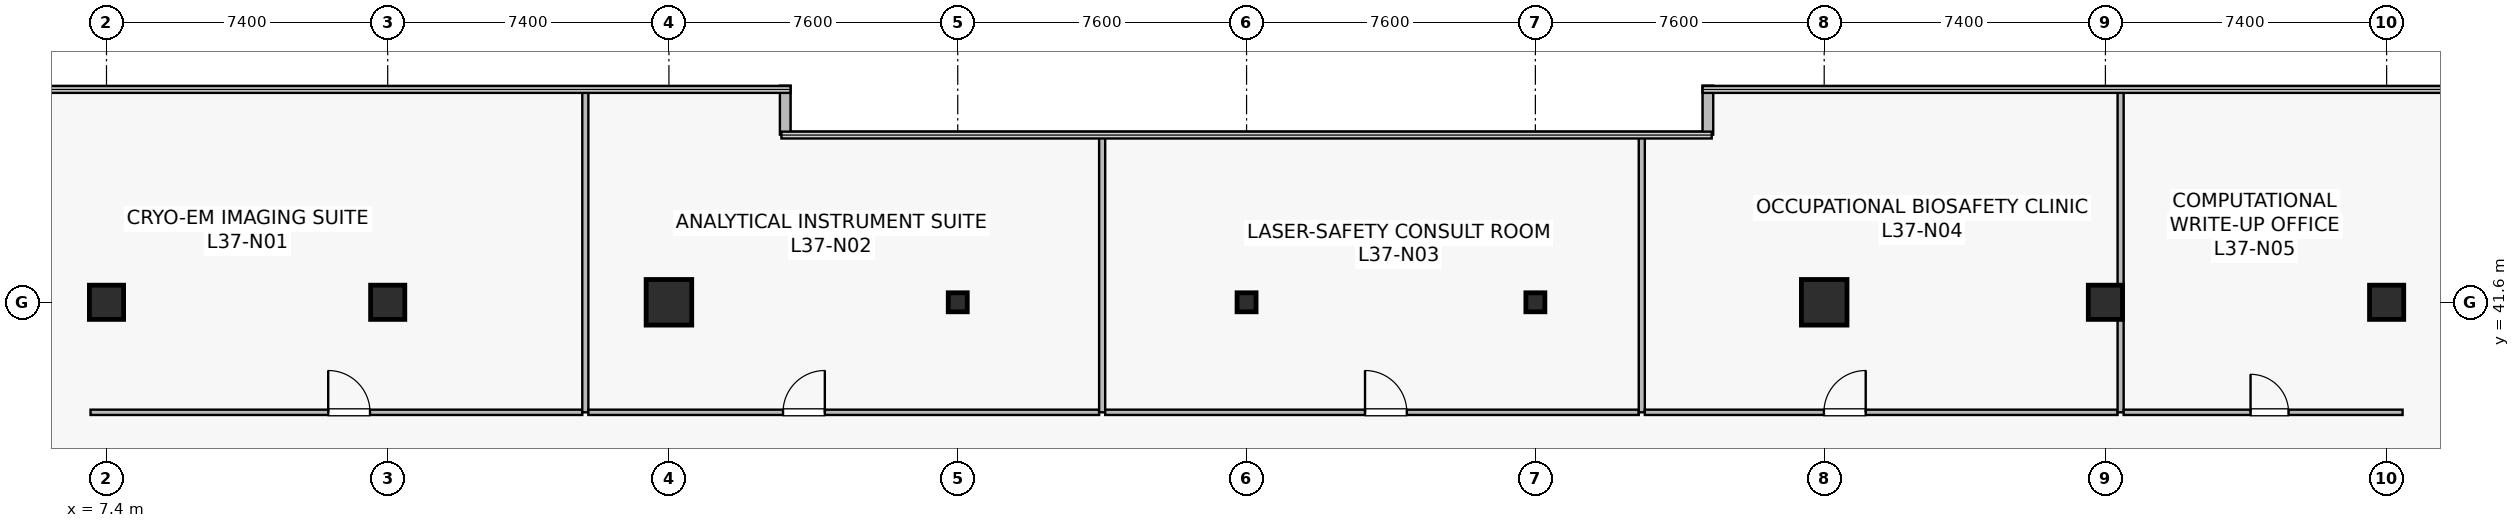
"""IFC4 building model, lengths in metres.
Left out: names, types, materials, properties, quantities, classifications, styles, units other than length and angle.
Written with IfcOpenShell. Run it as: python <this file> out.ifc"""

import sys

from ifc_helpers import new_model, si_unit, direction, frame, frame_2d, origin, origin_2d, place, context, subcontext, project, spatial, rectangle, hollow_rectangle, extrude, source, transform, mapped, element, fill, save


model = new_model("IFC4")
c1 = context("Model", 3, precision=1e-05, world=origin(), true_north=direction((0.0, 1.0)))
c2 = subcontext(c1, "Body", "Model", "MODEL_VIEW")
j1 = project(units=[si_unit("LENGTHUNIT", "METRE"), si_unit("PLANEANGLEUNIT", "RADIAN")], contexts=[c1])
p1 = place(None, origin())
s1 = spatial("IfcSite", under=j1, at=p1, CompositionType="ELEMENT")
p2 = place(p1, origin())
s2 = spatial("IfcBuilding", under=s1, at=p2, CompositionType="ELEMENT")
p3 = place(p2, frame((0.0, 0.0, 154.3)))
s3 = spatial("IfcBuildingStorey", under=s2, at=p3, CompositionType="ELEMENT", Elevation=154.3)
m1 = source(origin(), c2, "Body", "SweptSolid", [
    extrude(rectangle(XDim=0.9, YDim=0.9, at=origin_2d()), origin(), (0.0, 0.0, 1.0), 4.1),
])
p4 = place(p3, frame((14.8, 41.6, 0.0), z_axis=(0.0, 0.0, 1.0), x_axis=(1.0, 0.0, 0.0)))
e1 = element("IfcColumn", 1, at=p4, inside=s3, PredefinedType="COLUMN", context=c2, shape_type="MappedRepresentation", body=[
    mapped(m1, transform((0.0, 0.0, 0.0), scale=1.0)),
])
m2 = source(origin(), c2, "Body", "SweptSolid", [
    extrude(rectangle(XDim=1.2, YDim=1.2, at=origin_2d()), origin(), (0.0, 0.0, 1.0), 4.1),
])
for number, where, z_axis, x_axis in (
    (2, (22.2, 41.6, 0.0), (0.0, 0.0, 1.0), (1.0, 0.0, 0.0)),
    (3, (52.6, 41.6, 0.0), (0.0, 0.0, 1.0), (1.0, 0.0, 0.0)),
):
    element("IfcColumn", number, at=place(p3, frame(where, z_axis=z_axis, x_axis=x_axis)), inside=s3, PredefinedType="COLUMN", context=c2, shape_type="MappedRepresentation", body=[
        mapped(m2, transform((0.0, 0.0, 0.0), scale=1.0)),
    ])
for number, where, z_axis, x_axis in (
    (4, (60.0, 41.6, 0.0), (0.0, 0.0, 1.0), (1.0, 0.0, 0.0)),
    (5, (7.4, 41.6, 0.0), (0.0, 0.0, 1.0), (1.0, 0.0, 0.0)),
    (6, (67.4, 41.6, 0.0), (0.0, 0.0, 1.0), (1.0, 0.0, 0.0)),
):
    element("IfcColumn", number, at=place(p3, frame(where, z_axis=z_axis, x_axis=x_axis)), inside=s3, PredefinedType="COLUMN", context=c2, shape_type="MappedRepresentation", body=[
        mapped(m1, transform((0.0, 0.0, 0.0), scale=1.0)),
    ])
m3 = source(origin(), c2, "Body", "SweptSolid", [
    extrude(hollow_rectangle(XDim=0.5, YDim=0.5, WallThickness=0.022, at=origin_2d()), origin(), (0.0, 0.0, 1.0), 4.1),
])
for number, where, z_axis, x_axis in (
    (7, (29.8, 41.6, 0.0), (0.0, 0.0, 1.0), (1.0, 0.0, 0.0)),
    (8, (37.4, 41.6, 0.0), (0.0, 0.0, 1.0), (1.0, 0.0, 0.0)),
    (9, (45.0, 41.6, 0.0), (0.0, 0.0, 1.0), (1.0, 0.0, 0.0)),
):
    element("IfcColumn", number, at=place(p3, frame(where, z_axis=z_axis, x_axis=x_axis)), inside=s3, PredefinedType="COLUMN", context=c2, shape_type="MappedRepresentation", body=[
        mapped(m3, transform((0.0, 0.0, 0.0), scale=1.0)),
    ])
for number, where, z_axis, x_axis in (
    (10, (49.54, 47.3, 0.0), (0.0, 0.0, 1.0), (0.0, -1.0, 0.0)),
    (11, (25.26, 46.012, 0.0), (0.0, 0.0, 1.0), (0.0, 1.0, 0.0)),
):
    element("IfcWall", number, at=place(p3, frame(where, z_axis=z_axis, x_axis=x_axis)), inside=s3, PredefinedType="STANDARD", context=c2, shape_type="SweptSolid", body=[
        extrude(rectangle(XDim=1.288, YDim=0.28, at=frame_2d((0.644, 0.0))), origin(), (0.0, 0.0, 1.0), 3.79),
    ])
p5 = place(p3, frame((6.98, 38.705, 0.0), z_axis=(0.0, 0.0, 1.0), x_axis=(1.0, 0.0, 0.0)))
e12 = element("IfcWall", 12, at=p5, inside=s3, PredefinedType="PARTITIONING", context=c2, shape_type="SweptSolid", body=[
    extrude(rectangle(XDim=12.94, YDim=0.14, at=frame_2d((6.47, 0.0))), origin(), (0.0, 0.0, 1.0), 3.187),
])
p6 = place(p5, frame((6.254, 0.0, 0.0)))
e13 = element("IfcOpeningElement", 13, at=p6, cuts=e12, PredefinedType="OPENING", context=c2, shape_type="SweptSolid", body=[
    extrude(rectangle(XDim=1.1, YDim=2.18, at=frame_2d((0.55, 1.09))), frame((0.0, 0.08, 0.0), z_axis=(0.0, -1.0, 0.0), x_axis=(1.0, 0.0, 0.0)), (0.0, 0.0, 1.0), 0.16),
])
p7 = place(p3, frame((20.0, 38.705, 0.0), z_axis=(0.0, 0.0, 1.0), x_axis=(0.0, 1.0, 0.0)))
e14 = element("IfcWall", 14, at=p7, inside=s3, PredefinedType="PARTITIONING", context=c2, shape_type="SweptSolid", body=[
    extrude(rectangle(XDim=8.485, YDim=0.16, at=frame_2d((4.242, 0.0))), origin(), (0.0, 0.0, 1.0), 3.075),
])
p8 = place(p3, frame((20.08, 38.705, 0.0), z_axis=(0.0, 0.0, 1.0), x_axis=(1.0, 0.0, 0.0)))
e15 = element("IfcWall", 15, at=p8, inside=s3, PredefinedType="PARTITIONING", context=c2, shape_type="SweptSolid", body=[
    extrude(rectangle(XDim=13.44, YDim=0.14, at=frame_2d((6.72, 0.0))), origin(), (0.0, 0.0, 1.0), 3.187),
])
p9 = place(p8, frame((5.122, 0.0, 0.0)))
e16 = element("IfcOpeningElement", 16, at=p9, cuts=e15, PredefinedType="OPENING", context=c2, shape_type="SweptSolid", body=[
    extrude(rectangle(XDim=1.1, YDim=2.18, at=frame_2d((0.55, 1.09))), frame((0.0, 0.08, 0.0), z_axis=(0.0, -1.0, 0.0), x_axis=(1.0, 0.0, 0.0)), (0.0, 0.0, 1.0), 0.16),
])
p10 = place(p3, frame((33.6, 38.705, 0.0), z_axis=(0.0, 0.0, 1.0), x_axis=(0.0, 1.0, 0.0)))
e17 = element("IfcWall", 17, at=p10, inside=s3, PredefinedType="PARTITIONING", context=c2, shape_type="SweptSolid", body=[
    extrude(rectangle(XDim=7.285, YDim=0.16, at=frame_2d((3.643, 0.0))), origin(), (0.0, 0.0, 1.0), 3.075),
])
p11 = place(p3, frame((33.68, 38.705, 0.0), z_axis=(0.0, 0.0, 1.0), x_axis=(1.0, 0.0, 0.0)))
e18 = element("IfcWall", 18, at=p11, inside=s3, PredefinedType="PARTITIONING", context=c2, shape_type="SweptSolid", body=[
    extrude(rectangle(XDim=14.04, YDim=0.14, at=frame_2d((7.02, 0.0))), origin(), (0.0, 0.0, 1.0), 3.187),
])
p12 = place(p11, frame((6.837, 0.0, 0.0)))
e19 = element("IfcOpeningElement", 19, at=p12, cuts=e18, PredefinedType="OPENING", context=c2, shape_type="SweptSolid", body=[
    extrude(rectangle(XDim=1.1, YDim=2.18, at=frame_2d((0.55, 1.09))), frame((0.0, 0.08, 0.0), z_axis=(0.0, -1.0, 0.0), x_axis=(1.0, 0.0, 0.0)), (0.0, 0.0, 1.0), 0.16),
])
p13 = place(p3, frame((47.8, 38.705, 0.0), z_axis=(0.0, 0.0, 1.0), x_axis=(0.0, 1.0, 0.0)))
e20 = element("IfcWall", 20, at=p13, inside=s3, PredefinedType="PARTITIONING", context=c2, shape_type="SweptSolid", body=[
    extrude(rectangle(XDim=7.285, YDim=0.16, at=frame_2d((3.643, 0.0))), origin(), (0.0, 0.0, 1.0), 3.075),
])
p14 = place(p3, frame((47.88, 38.705, 0.0), z_axis=(0.0, 0.0, 1.0), x_axis=(1.0, 0.0, 0.0)))
e21 = element("IfcWall", 21, at=p14, inside=s3, PredefinedType="PARTITIONING", context=c2, shape_type="SweptSolid", body=[
    extrude(rectangle(XDim=12.44, YDim=0.14, at=frame_2d((6.22, 0.0))), origin(), (0.0, 0.0, 1.0), 3.187),
])
p15 = place(p14, frame((4.712, 0.0, 0.0)))
e22 = element("IfcOpeningElement", 22, at=p15, cuts=e21, PredefinedType="OPENING", context=c2, shape_type="SweptSolid", body=[
    extrude(rectangle(XDim=1.1, YDim=2.18, at=frame_2d((0.55, 1.09))), frame((0.0, 0.08, 0.0), z_axis=(0.0, -1.0, 0.0), x_axis=(1.0, 0.0, 0.0)), (0.0, 0.0, 1.0), 0.16),
])
p16 = place(p3, frame((60.4, 38.705, 0.0), z_axis=(0.0, 0.0, 1.0), x_axis=(0.0, 1.0, 0.0)))
e23 = element("IfcWall", 23, at=p16, inside=s3, PredefinedType="PARTITIONING", context=c2, shape_type="SweptSolid", body=[
    extrude(rectangle(XDim=8.485, YDim=0.16, at=frame_2d((4.242, 0.0))), origin(), (0.0, 0.0, 1.0), 3.075),
])
p17 = place(p3, frame((60.48, 38.705, 0.0), z_axis=(0.0, 0.0, 1.0), x_axis=(1.0, 0.0, 0.0)))
e24 = element("IfcWall", 24, at=p17, inside=s3, PredefinedType="PARTITIONING", context=c2, shape_type="SweptSolid", body=[
    extrude(rectangle(XDim=7.34, YDim=0.14, at=frame_2d((3.67, 0.0))), origin(), (0.0, 0.0, 1.0), 3.275),
])
p18 = place(p17, frame((3.339, 0.0, 0.0)))
e25 = element("IfcOpeningElement", 25, at=p18, cuts=e24, PredefinedType="OPENING", context=c2, shape_type="SweptSolid", body=[
    extrude(rectangle(XDim=1.0, YDim=2.15, at=frame_2d((0.5, 1.075))), frame((0.0, 0.08, 0.0), z_axis=(0.0, -1.0, 0.0), x_axis=(1.0, 0.0, 0.0)), (0.0, 0.0, 1.0), 0.16),
])
m4 = source(origin(), c2, "Body", "SweptSolid", [
    extrude(rectangle(XDim=1.1, YDim=2.18, at=frame_2d((0.55, 1.09))), frame((0.0, 0.025, 0.0), z_axis=(0.0, -1.0, 0.0), x_axis=(1.0, 0.0, 0.0)), (0.0, 0.0, 1.0), 0.05),
])
p19 = place(p6, origin())
e26 = element("IfcDoor", 26, at=p19, inside=s3, OperationType="SINGLE_SWING_LEFT", PredefinedType="DOOR", context=c2, shape_type="MappedRepresentation", body=[
    mapped(m4, transform((0.0, 0.0, 0.0), scale=1.0)),
])
fill(e13, e26)
p20 = place(p9, origin())
e27 = element("IfcDoor", 27, at=p20, inside=s3, OperationType="SINGLE_SWING_RIGHT", PredefinedType="DOOR", context=c2, shape_type="MappedRepresentation", body=[
    mapped(m4, transform((0.0, 0.0, 0.0), scale=1.0)),
])
fill(e16, e27)
p21 = place(p12, origin())
e28 = element("IfcDoor", 28, at=p21, inside=s3, OperationType="SINGLE_SWING_LEFT", PredefinedType="DOOR", context=c2, shape_type="MappedRepresentation", body=[
    mapped(m4, transform((0.0, 0.0, 0.0), scale=1.0)),
])
fill(e19, e28)
p22 = place(p15, origin())
e29 = element("IfcDoor", 29, at=p22, inside=s3, OperationType="SINGLE_SWING_RIGHT", PredefinedType="DOOR", context=c2, shape_type="MappedRepresentation", body=[
    mapped(m4, transform((0.0, 0.0, 0.0), scale=1.0)),
])
fill(e22, e29)
m5 = source(origin(), c2, "Body", "SweptSolid", [
    extrude(rectangle(XDim=1.0, YDim=2.15, at=frame_2d((0.5, 1.075))), frame((0.0, 0.025, 0.0), z_axis=(0.0, -1.0, 0.0), x_axis=(1.0, 0.0, 0.0)), (0.0, 0.0, 1.0), 0.05),
])
p23 = place(p18, origin())
e30 = element("IfcDoor", 30, at=p23, inside=s3, OperationType="SINGLE_SWING_LEFT", PredefinedType="DOOR", context=c2, shape_type="MappedRepresentation", body=[
    mapped(m5, transform((0.0, 0.0, 0.0), scale=1.0)),
])
fill(e25, e30)
save(model, sys.argv[1])
